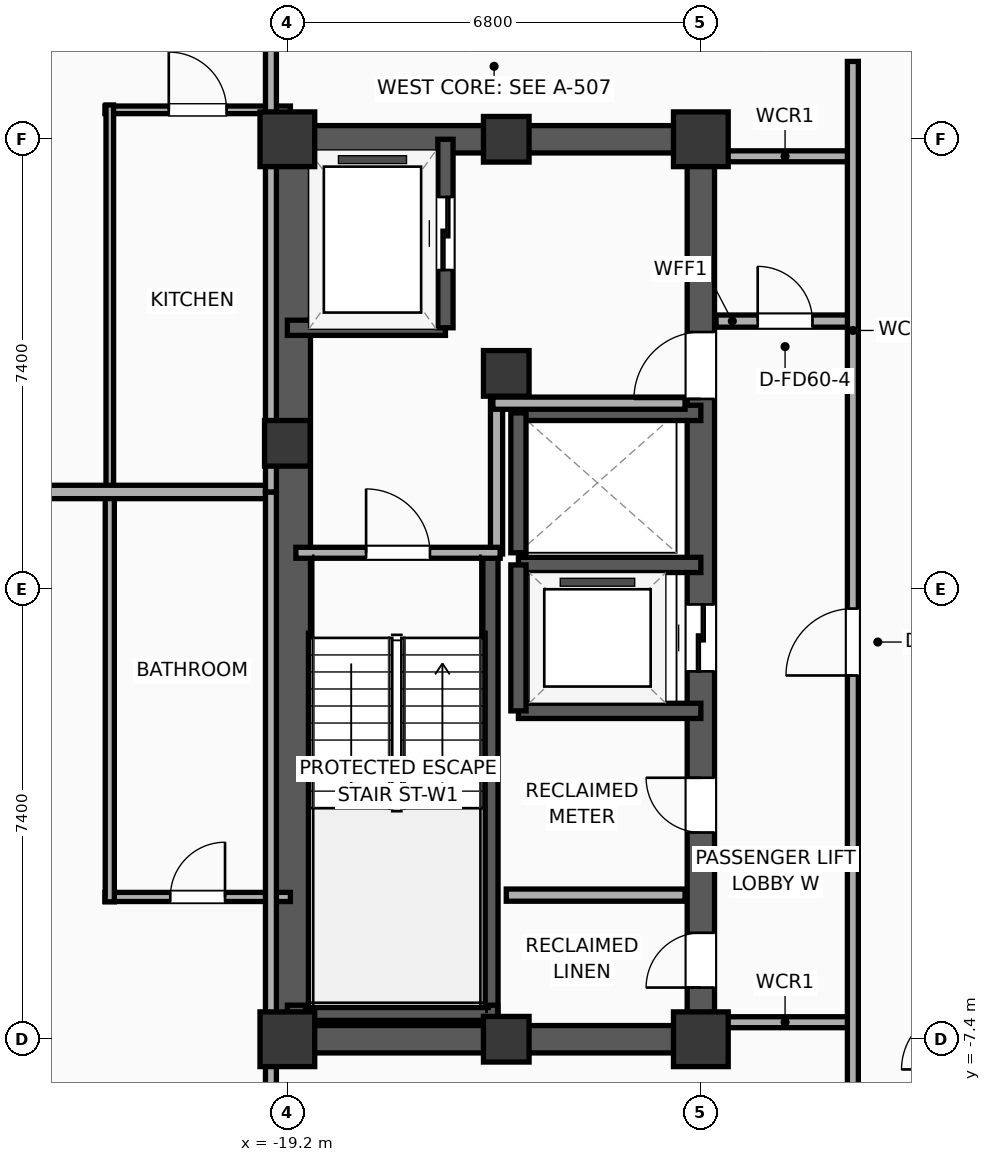
"""IFC4 building model, lengths in metres.
Left out: names, types, materials, properties, quantities, classifications, styles, units other than length and angle.
Written with IfcOpenShell. Run it as: python <this file> out.ifc"""

import sys

from ifc_helpers import new_model, si_unit, direction, frame, frame_2d, origin, origin_2d, place, context, subcontext, project, spatial, rectangle, extrude, element, fill, save


model = new_model("IFC4")
c1 = context("Model", 3, precision=1e-05, world=origin(), true_north=direction((0.0, 1.0)))
c2 = subcontext(c1, "Body", "Model", "MODEL_VIEW")
j1 = project(units=[si_unit("LENGTHUNIT", "METRE"), si_unit("PLANEANGLEUNIT", "RADIAN")], contexts=[c1])
p1 = place(None, origin())
s1 = spatial("IfcSite", under=j1, at=p1, CompositionType="ELEMENT")
p2 = place(p1, origin())
s2 = spatial("IfcBuilding", under=s1, at=p2, CompositionType="ELEMENT")
p3 = place(p2, frame((0.0, 0.0, 191.1)))
s3 = spatial("IfcBuildingStorey", under=s2, at=p3, CompositionType="ELEMENT", Elevation=191.1)
p4 = place(p3, frame((-19.2, -7.4, 0.0), z_axis=(0.0, 0.0, 1.0), x_axis=(1.0, 0.0, 0.0)))
e1 = element("IfcColumn", 1, at=p4, inside=s3, PredefinedType="COLUMN", context=c2, shape_type="SweptSolid", body=[
    extrude(rectangle(XDim=0.9, YDim=0.9, at=origin_2d()), origin(), (0.0, 0.0, 1.0), 3.9),
])
p5 = place(p3, frame((-19.2, 2.4, 0.0), z_axis=(0.0, 0.0, 1.0), x_axis=(1.0, 0.0, 0.0)))
e2 = element("IfcColumn", 2, at=p5, inside=s3, PredefinedType="COLUMN", context=c2, shape_type="SweptSolid", body=[
    extrude(rectangle(XDim=0.75, YDim=0.75, at=origin_2d()), origin(), (0.0, 0.0, 1.0), 3.9),
])
p6 = place(p3, frame((-19.2, 7.4, 0.0), z_axis=(0.0, 0.0, 1.0), x_axis=(1.0, 0.0, 0.0)))
e3 = element("IfcColumn", 3, at=p6, inside=s3, PredefinedType="COLUMN", context=c2, shape_type="SweptSolid", body=[
    extrude(rectangle(XDim=0.9, YDim=0.9, at=origin_2d()), origin(), (0.0, 0.0, 1.0), 3.9),
])
for number, where, z_axis, x_axis in (
    (4, (-15.6, -7.4, 0.0), (0.0, 0.0, 1.0), (1.0, 0.0, 0.0)),
    (5, (-15.6, 7.4, 0.0), (0.0, 0.0, 1.0), (1.0, 0.0, 0.0)),
):
    element("IfcColumn", number, at=place(p3, frame(where, z_axis=z_axis, x_axis=x_axis)), inside=s3, PredefinedType="COLUMN", context=c2, shape_type="SweptSolid", body=[
        extrude(rectangle(XDim=0.75, YDim=0.75, at=origin_2d()), origin(), (0.0, 0.0, 1.0), 3.9),
    ])
p7 = place(p3, frame((-12.4, -7.4, 0.0), z_axis=(0.0, 0.0, 1.0), x_axis=(1.0, 0.0, 0.0)))
e6 = element("IfcColumn", 6, at=p7, inside=s3, PredefinedType="COLUMN", context=c2, shape_type="SweptSolid", body=[
    extrude(rectangle(XDim=0.9, YDim=0.9, at=origin_2d()), origin(), (0.0, 0.0, 1.0), 3.9),
])
p8 = place(p3, frame((-15.6, 3.55, 0.0), z_axis=(0.0, 0.0, 1.0), x_axis=(1.0, 0.0, 0.0)))
e7 = element("IfcColumn", 7, at=p8, inside=s3, PredefinedType="COLUMN", context=c2, shape_type="SweptSolid", body=[
    extrude(rectangle(XDim=0.75, YDim=0.75, at=origin_2d()), origin(), (0.0, 0.0, 1.0), 3.9),
])
p9 = place(p3, frame((-12.4, 7.4, 0.0), z_axis=(0.0, 0.0, 1.0), x_axis=(1.0, 0.0, 0.0)))
e8 = element("IfcColumn", 8, at=p9, inside=s3, PredefinedType="COLUMN", context=c2, shape_type="SweptSolid", body=[
    extrude(rectangle(XDim=0.9, YDim=0.9, at=origin_2d()), origin(), (0.0, 0.0, 1.0), 3.9),
])
for number, where, z_axis, x_axis in (
    (9, (-19.425, -7.4, 0.0), (0.0, 0.0, 1.0), (1.0, 0.0, 0.0)),
    (10, (-19.425, 7.4, 0.0), (0.0, 0.0, 1.0), (1.0, 0.0, 0.0)),
):
    element("IfcWall", number, at=place(p3, frame(where, z_axis=z_axis, x_axis=x_axis)), inside=s3, PredefinedType="SHEAR", context=c2, shape_type="SweptSolid", body=[
        extrude(rectangle(XDim=7.25, YDim=0.45, at=frame_2d((3.625, 0.0))), origin(), (0.0, 0.0, 1.0), 3.5),
    ])
p10 = place(p3, frame((-19.145, -7.4, 0.0), z_axis=(0.0, 0.0, 1.0), x_axis=(0.0, 1.0, 0.0)))
e11 = element("IfcWall", 11, at=p10, inside=s3, PredefinedType="SHEAR", context=c2, shape_type="SweptSolid", body=[
    extrude(rectangle(XDim=14.8, YDim=0.65, at=frame_2d((7.4, 0.0))), origin(), (0.0, 0.0, 1.0), 3.5),
])
p11 = place(p3, frame((-12.4, -7.4, 0.0), z_axis=(0.0, 0.0, 1.0), x_axis=(0.0, 1.0, 0.0)))
e12 = element("IfcWall", 12, at=p11, inside=s3, PredefinedType="SHEAR", context=c2, shape_type="SweptSolid", body=[
    extrude(rectangle(XDim=14.8, YDim=0.45, at=frame_2d((7.4, 0.0))), origin(), (0.0, 0.0, 1.0), 3.5),
])
p12 = place(p11, frame((6.05, 0.0, 0.0)))
e13 = element("IfcOpeningElement", 13, at=p12, cuts=e12, PredefinedType="OPENING", context=c2, shape_type="SweptSolid", body=[
    extrude(rectangle(XDim=1.1, YDim=2.05, at=frame_2d((0.55, 1.025))), frame((0.0, 0.235, 0.0), z_axis=(0.0, -1.0, 0.0), x_axis=(1.0, 0.0, 0.0)), (0.0, 0.0, 1.0), 0.47),
])
p13 = place(p11, frame((10.53, 0.0, 0.0)))
e14 = element("IfcOpeningElement", 14, at=p13, cuts=e12, PredefinedType="OPENING", context=c2, shape_type="SweptSolid", body=[
    extrude(rectangle(XDim=1.1, YDim=2.05, at=frame_2d((0.55, 1.025))), frame((0.0, 0.235, 0.0), z_axis=(0.0, -1.0, 0.0), x_axis=(1.0, 0.0, 0.0)), (0.0, 0.0, 1.0), 0.47),
])
p14 = place(p11, frame((0.85, 0.0, 0.0)))
e15 = element("IfcOpeningElement", 15, at=p14, cuts=e12, PredefinedType="OPENING", context=c2, shape_type="SweptSolid", body=[
    extrude(rectangle(XDim=0.9, YDim=2.05, at=frame_2d((0.45, 1.025))), frame((0.0, 0.235, 0.0), z_axis=(0.0, -1.0, 0.0), x_axis=(1.0, 0.0, 0.0)), (0.0, 0.0, 1.0), 0.47),
])
p15 = place(p11, frame((3.4, 0.0, 0.0)))
e16 = element("IfcOpeningElement", 16, at=p15, cuts=e12, PredefinedType="OPENING", context=c2, shape_type="SweptSolid", body=[
    extrude(rectangle(XDim=0.9, YDim=2.05, at=frame_2d((0.45, 1.025))), frame((0.0, 0.235, 0.0), z_axis=(0.0, -1.0, 0.0), x_axis=(1.0, 0.0, 0.0)), (0.0, 0.0, 1.0), 0.47),
])
p16 = place(p3, frame((-15.86, -7.085, 0.0), z_axis=(0.0, 0.0, 1.0), x_axis=(0.0, 1.0, 0.0)))
e17 = element("IfcWall", 17, at=p16, inside=s3, PredefinedType="SOLIDWALL", context=c2, shape_type="SweptSolid", body=[
    extrude(rectangle(XDim=7.685, YDim=0.25, at=frame_2d((3.843, 0.0))), origin(), (0.0, 0.0, 1.0), 3.5),
])
p17 = place(p3, frame((-19.2, -6.965, 0.0), z_axis=(0.0, 0.0, 1.0), x_axis=(1.0, 0.0, 0.0)))
e18 = element("IfcWall", 18, at=p17, inside=s3, PredefinedType="SOLIDWALL", context=c2, shape_type="SweptSolid", body=[
    extrude(rectangle(XDim=3.46, YDim=0.25, at=frame_2d((1.73, 0.0))), origin(), (0.0, 0.0, 1.0), 3.5),
])
p18 = place(p3, frame((-19.2, 4.3, 0.0), z_axis=(0.0, 0.0, 1.0), x_axis=(1.0, 0.0, 0.0)))
e19 = element("IfcWall", 19, at=p18, inside=s3, PredefinedType="SOLIDWALL", context=c2, shape_type="SweptSolid", body=[
    extrude(rectangle(XDim=2.6, YDim=0.25, at=frame_2d((1.3, 0.0))), origin(), (0.0, 0.0, 1.0), 3.5),
])
p19 = place(p3, frame((-16.6, 4.3, 0.0), z_axis=(0.0, 0.0, 1.0), x_axis=(0.0, 1.0, 0.0)))
e20 = element("IfcWall", 20, at=p19, inside=s3, PredefinedType="SOLIDWALL", context=c2, shape_type="SweptSolid", body=[
    extrude(rectangle(XDim=3.1, YDim=0.25, at=frame_2d((1.55, 0.0))), origin(), (0.0, 0.0, 1.0), 3.5),
])
p20 = place(p19, frame((0.95, 0.0, 0.0)))
e21 = element("IfcOpeningElement", 21, at=p20, cuts=e20, PredefinedType="OPENING", context=c2, shape_type="SweptSolid", body=[
    extrude(rectangle(XDim=1.2, YDim=2.05, at=frame_2d((0.6, 1.025))), frame((0.0, 0.135, 0.0), z_axis=(0.0, -1.0, 0.0), x_axis=(1.0, 0.0, 0.0)), (0.0, 0.0, 1.0), 0.27),
])
for number, where, z_axis, x_axis in (
    (22, (-15.4, -2.0, 0.0), (0.0, 0.0, 1.0), (1.0, 0.0, 0.0)),
    (23, (-12.4, 0.4, 0.0), (0.0, 0.0, 1.0), (-1.0, 0.0, 0.0)),
):
    element("IfcWall", number, at=place(p3, frame(where, z_axis=z_axis, x_axis=x_axis)), inside=s3, PredefinedType="SOLIDWALL", context=c2, shape_type="SweptSolid", body=[
        extrude(rectangle(XDim=3.0, YDim=0.25, at=frame_2d((1.5, 0.0))), origin(), (0.0, 0.0, 1.0), 3.5),
    ])
p21 = place(p3, frame((-15.4, 0.4, 0.0), z_axis=(0.0, 0.0, 1.0), x_axis=(0.0, -1.0, 0.0)))
e24 = element("IfcWall", 24, at=p21, inside=s3, PredefinedType="SOLIDWALL", context=c2, shape_type="SweptSolid", body=[
    extrude(rectangle(XDim=2.4, YDim=0.25, at=frame_2d((1.2, 0.0))), origin(), (0.0, 0.0, 1.0), 3.5),
])
p22 = place(p3, frame((-12.4, 2.9, 0.0), z_axis=(0.0, 0.0, 1.0), x_axis=(-1.0, 0.0, 0.0)))
e25 = element("IfcWall", 25, at=p22, inside=s3, PredefinedType="SOLIDWALL", context=c2, shape_type="SweptSolid", body=[
    extrude(rectangle(XDim=3.0, YDim=0.25, at=frame_2d((1.5, 0.0))), origin(), (0.0, 0.0, 1.0), 3.5),
])
p23 = place(p3, frame((-15.4, 2.9, 0.0), z_axis=(0.0, 0.0, 1.0), x_axis=(0.0, -1.0, 0.0)))
e26 = element("IfcWall", 26, at=p23, inside=s3, PredefinedType="SOLIDWALL", context=c2, shape_type="SweptSolid", body=[
    extrude(rectangle(XDim=2.3, YDim=0.25, at=frame_2d((1.15, 0.0))), origin(), (0.0, 0.0, 1.0), 3.5),
])
p24 = place(p3, frame((-15.76, 0.58, 0.0), z_axis=(0.0, 0.0, 1.0), x_axis=(0.0, 1.0, 0.0)))
e27 = element("IfcWall", 27, at=p24, inside=s3, PredefinedType="PARTITIONING", context=c2, shape_type="SweptSolid", body=[
    extrude(rectangle(XDim=2.52, YDim=0.2, at=frame_2d((1.26, 0.0))), origin(), (0.0, 0.0, 1.0), 3.5),
])
p25 = place(p3, frame((-15.82, 3.06, 0.0), z_axis=(0.0, 0.0, 1.0), x_axis=(1.0, 0.0, 0.0)))
e28 = element("IfcWall", 28, at=p25, inside=s3, PredefinedType="PARTITIONING", context=c2, shape_type="SweptSolid", body=[
    extrude(rectangle(XDim=3.16, YDim=0.2, at=frame_2d((1.58, 0.0))), origin(), (0.0, 0.0, 1.0), 3.5),
])
p26 = place(p3, frame((-19.06, 0.6, 0.0), z_axis=(0.0, 0.0, 1.0), x_axis=(1.0, 0.0, 0.0)))
e29 = element("IfcWall", 29, at=p26, inside=s3, PredefinedType="PARTITIONING", context=c2, shape_type="SweptSolid", body=[
    extrude(rectangle(XDim=3.36, YDim=0.18, at=frame_2d((1.68, 0.0))), origin(), (0.0, 0.0, 1.0), 3.5),
])
p27 = place(p26, frame((1.155, 0.0, 0.0)))
e30 = element("IfcOpeningElement", 30, at=p27, cuts=e29, PredefinedType="OPENING", context=c2, shape_type="SweptSolid", body=[
    extrude(rectangle(XDim=1.05, YDim=2.05, at=frame_2d((0.525, 1.025))), frame((0.0, 0.1, 0.0), z_axis=(0.0, -1.0, 0.0), x_axis=(1.0, 0.0, 0.0)), (0.0, 0.0, 1.0), 0.2),
])
p28 = place(p3, frame((-15.6, -5.03, 0.0), z_axis=(0.0, 0.0, 1.0), x_axis=(1.0, 0.0, 0.0)))
e31 = element("IfcWall", 31, at=p28, inside=s3, PredefinedType="PARTITIONING", context=c2, shape_type="SweptSolid", body=[
    extrude(rectangle(XDim=2.94, YDim=0.2, at=frame_2d((1.47, 0.0))), origin(), (0.0, 0.0, 1.0), 3.5),
])
p29 = place(p3, frame((-12.15, 4.41, 0.0), z_axis=(0.0, 0.0, 1.0), x_axis=(1.0, 0.0, 0.0)))
e32 = element("IfcWall", 32, at=p29, inside=s3, PredefinedType="PARTITIONING", context=c2, shape_type="SweptSolid", body=[
    extrude(rectangle(XDim=2.27, YDim=0.2, at=frame_2d((1.135, 0.0))), origin(), (0.0, 0.0, 1.0), 3.5),
])
p30 = place(p29, frame((0.685, 0.0, 0.0)))
e33 = element("IfcOpeningElement", 33, at=p30, cuts=e32, PredefinedType="OPENING", context=c2, shape_type="SweptSolid", body=[
    extrude(rectangle(XDim=0.9, YDim=2.05, at=frame_2d((0.45, 1.025))), frame((0.0, 0.11, 0.0), z_axis=(0.0, -1.0, 0.0), x_axis=(1.0, 0.0, 0.0)), (0.0, 0.0, 1.0), 0.22),
])
for number, where, z_axis, x_axis in (
    (34, (-12.15, 7.12, 0.0), (0.0, 0.0, 1.0), (1.0, 0.0, 0.0)),
    (35, (-12.15, -7.12, 0.0), (0.0, 0.0, 1.0), (1.0, 0.0, 0.0)),
):
    element("IfcWall", number, at=place(p3, frame(where, z_axis=z_axis, x_axis=x_axis)), inside=s3, PredefinedType="PARTITIONING", context=c2, shape_type="SweptSolid", body=[
        extrude(rectangle(XDim=2.27, YDim=0.18, at=frame_2d((1.135, 0.0))), origin(), (0.0, 0.0, 1.0), 2.54),
    ])
p31 = place(p3, frame((-9.9, -8.68, 0.0), z_axis=(0.0, 0.0, 1.0), x_axis=(0.0, 1.0, 0.0)))
e36 = element("IfcWall", 36, at=p31, inside=s3, PredefinedType="PARTITIONING", context=c2, shape_type="SweptSolid", body=[
    extrude(rectangle(XDim=17.36, YDim=0.18, at=frame_2d((8.68, 0.0))), origin(), (0.0, 0.0, 1.0), 3.5),
])
p32 = place(p31, frame((7.262, 0.0, 0.0)))
e37 = element("IfcOpeningElement", 37, at=p32, cuts=e36, PredefinedType="OPENING", context=c2, shape_type="SweptSolid", body=[
    extrude(rectangle(XDim=1.1, YDim=2.05, at=frame_2d((0.55, 1.025))), frame((0.0, 0.1, 0.0), z_axis=(0.0, -1.0, 0.0), x_axis=(1.0, 0.0, 0.0)), (0.0, 0.0, 1.0), 0.2),
])
p33 = place(p3, frame((-22.2, -5.06, 0.0), z_axis=(0.0, 0.0, 1.0), x_axis=(1.0, 0.0, 0.0)))
e38 = element("IfcWall", 38, at=p33, inside=s3, PredefinedType="PLUMBINGWALL", context=c2, shape_type="SweptSolid", body=[
    extrude(rectangle(XDim=3.05, YDim=0.15, at=frame_2d((1.525, 0.0))), origin(), (0.0, 0.0, 1.0), 3.5),
])
p34 = place(p33, frame((1.075, 0.0, 0.0)))
e39 = element("IfcOpeningElement", 39, at=p34, cuts=e38, PredefinedType="OPENING", context=c2, shape_type="SweptSolid", body=[
    extrude(rectangle(XDim=0.9, YDim=2.05, at=frame_2d((0.45, 1.025))), frame((0.0, 0.085, 0.0), z_axis=(0.0, -1.0, 0.0), x_axis=(1.0, 0.0, 0.0)), (0.0, 0.0, 1.0), 0.17),
])
p35 = place(p3, frame((-22.12, -5.14, 0.0), z_axis=(0.0, 0.0, 1.0), x_axis=(0.0, 1.0, 0.0)))
e40 = element("IfcWall", 40, at=p35, inside=s3, PredefinedType="PLUMBINGWALL", context=c2, shape_type="SweptSolid", body=[
    extrude(rectangle(XDim=6.72, YDim=0.15, at=frame_2d((3.36, 0.0))), origin(), (0.0, 0.0, 1.0), 3.5),
])
p36 = place(p3, frame((-22.2, 7.884, 0.0), z_axis=(0.0, 0.0, 1.0), x_axis=(1.0, 0.0, 0.0)))
e41 = element("IfcWall", 41, at=p36, inside=s3, PredefinedType="PARTITIONING", context=c2, shape_type="SweptSolid", body=[
    extrude(rectangle(XDim=3.05, YDim=0.125, at=frame_2d((1.525, 0.0))), origin(), (0.0, 0.0, 1.0), 2.39),
])
p37 = place(p36, frame((1.05, 0.0, 0.0)))
e42 = element("IfcOpeningElement", 42, at=p37, cuts=e41, PredefinedType="OPENING", context=c2, shape_type="SweptSolid", body=[
    extrude(rectangle(XDim=0.95, YDim=2.05, at=frame_2d((0.475, 1.025))), frame((0.0, 0.073, 0.0), z_axis=(0.0, -1.0, 0.0), x_axis=(1.0, 0.0, 0.0)), (0.0, 0.0, 1.0), 0.145),
])
p38 = place(p3, frame((-22.12, 1.62, 0.0), z_axis=(0.0, 0.0, 1.0), x_axis=(0.0, 1.0, 0.0)))
e43 = element("IfcWall", 43, at=p38, inside=s3, PredefinedType="PARTITIONING", context=c2, shape_type="SweptSolid", body=[
    extrude(rectangle(XDim=6.344, YDim=0.125, at=frame_2d((3.172, 0.0))), origin(), (0.0, 0.0, 1.0), 3.5),
])
p39 = place(p3, frame((-19.47, 1.6, 0.0), z_axis=(0.0, 0.0, 1.0), x_axis=(-1.0, 0.0, 0.0)))
e44 = element("IfcWall", 44, at=p39, inside=s3, PredefinedType="PARTITIONING", context=c2, shape_type="SweptSolid", body=[
    extrude(rectangle(XDim=13.754, YDim=0.22, at=frame_2d((6.877, 0.0))), origin(), (0.0, 0.0, 1.0), 3.5),
])
p40 = place(p3, frame((-19.47, -22.652, 0.0), z_axis=(0.0, 0.0, 1.0), x_axis=(0.0, 1.0, 0.0)))
e45 = element("IfcWall", 45, at=p40, inside=s3, PredefinedType="PARTITIONING", context=c2, shape_type="SweptSolid", body=[
    extrude(rectangle(XDim=24.252, YDim=0.18, at=frame_2d((12.126, 0.0))), origin(), (0.0, 0.0, 1.0), 2.39),
])
p41 = place(p40, frame((12.871, 0.0, 0.0)))
e46 = element("IfcOpeningElement", 46, at=p41, cuts=e45, PredefinedType="OPENING", context=c2, shape_type="SweptSolid", body=[
    extrude(rectangle(XDim=0.9, YDim=2.05, at=frame_2d((0.45, 1.025))), frame((0.0, 0.1, 0.0), z_axis=(0.0, -1.0, 0.0), x_axis=(1.0, 0.0, 0.0)), (0.0, 0.0, 1.0), 0.2),
])
p42 = place(p3, frame((-19.47, 1.6, 0.0), z_axis=(0.0, 0.0, 1.0), x_axis=(0.0, 1.0, 0.0)))
e47 = element("IfcWall", 47, at=p42, inside=s3, PredefinedType="PARTITIONING", context=c2, shape_type="SweptSolid", body=[
    extrude(rectangle(XDim=16.431, YDim=0.18, at=frame_2d((8.216, 0.0))), origin(), (0.0, 0.0, 1.0), 2.39),
])
p43 = place(p42, frame((7.279, 0.0, 0.0)))
e48 = element("IfcOpeningElement", 48, at=p43, cuts=e47, PredefinedType="OPENING", context=c2, shape_type="SweptSolid", body=[
    extrude(rectangle(XDim=0.9, YDim=2.05, at=frame_2d((0.45, 1.025))), frame((0.0, 0.1, 0.0), z_axis=(0.0, -1.0, 0.0), x_axis=(1.0, 0.0, 0.0)), (0.0, 0.0, 1.0), 0.2),
])
p44 = place(p20, origin())
e49 = element("IfcDoor", 49, at=p44, inside=s3, OperationType="SLIDING_TO_LEFT", PredefinedType="DOOR", context=c2, shape_type="SweptSolid", body=[
    extrude(rectangle(XDim=1.2, YDim=2.05, at=frame_2d((0.6, 1.025))), frame((0.0, 0.025, 0.0), z_axis=(0.0, -1.0, 0.0), x_axis=(1.0, 0.0, 0.0)), (0.0, 0.0, 1.0), 0.05),
])
fill(e21, e49)
p45 = place(p12, origin())
e50 = element("IfcDoor", 50, at=p45, inside=s3, OperationType="SLIDING_TO_LEFT", PredefinedType="DOOR", context=c2, shape_type="SweptSolid", body=[
    extrude(rectangle(XDim=1.1, YDim=2.05, at=frame_2d((0.55, 1.025))), frame((0.0, 0.025, 0.0), z_axis=(0.0, -1.0, 0.0), x_axis=(1.0, 0.0, 0.0)), (0.0, 0.0, 1.0), 0.05),
])
fill(e13, e50)
p46 = place(p27, origin())
e51 = element("IfcDoor", 51, at=p46, inside=s3, OperationType="SINGLE_SWING_LEFT", PredefinedType="DOOR", context=c2, shape_type="SweptSolid", body=[
    extrude(rectangle(XDim=1.05, YDim=2.05, at=frame_2d((0.525, 1.025))), frame((0.0, 0.025, 0.0), z_axis=(0.0, -1.0, 0.0), x_axis=(1.0, 0.0, 0.0)), (0.0, 0.0, 1.0), 0.05),
])
fill(e30, e51)
p47 = place(p30, origin())
e52 = element("IfcDoor", 52, at=p47, inside=s3, OperationType="SINGLE_SWING_LEFT", PredefinedType="DOOR", context=c2, shape_type="SweptSolid", body=[
    extrude(rectangle(XDim=0.9, YDim=2.05, at=frame_2d((0.45, 1.025))), frame((0.0, 0.025, 0.0), z_axis=(0.0, -1.0, 0.0), x_axis=(1.0, 0.0, 0.0)), (0.0, 0.0, 1.0), 0.05),
])
fill(e33, e52)
p48 = place(p32, origin())
e53 = element("IfcDoor", 53, at=p48, inside=s3, OperationType="SINGLE_SWING_LEFT", PredefinedType="DOOR", context=c2, shape_type="SweptSolid", body=[
    extrude(rectangle(XDim=1.1, YDim=2.05, at=frame_2d((0.55, 1.025))), frame((0.0, 0.025, 0.0), z_axis=(0.0, -1.0, 0.0), x_axis=(1.0, 0.0, 0.0)), (0.0, 0.0, 1.0), 0.05),
])
fill(e37, e53)
p49 = place(p34, origin())
e54 = element("IfcDoor", 54, at=p49, inside=s3, OperationType="SINGLE_SWING_RIGHT", PredefinedType="DOOR", context=c2, shape_type="SweptSolid", body=[
    extrude(rectangle(XDim=0.9, YDim=2.05, at=frame_2d((0.45, 1.025))), frame((0.0, 0.025, 0.0), z_axis=(0.0, -1.0, 0.0), x_axis=(1.0, 0.0, 0.0)), (0.0, 0.0, 1.0), 0.05),
])
fill(e39, e54)
p50 = place(p37, origin())
e55 = element("IfcDoor", 55, at=p50, inside=s3, OperationType="SINGLE_SWING_LEFT", PredefinedType="DOOR", context=c2, shape_type="SweptSolid", body=[
    extrude(rectangle(XDim=0.95, YDim=2.05, at=frame_2d((0.475, 1.025))), frame((0.0, 0.025, 0.0), z_axis=(0.0, -1.0, 0.0), x_axis=(1.0, 0.0, 0.0)), (0.0, 0.0, 1.0), 0.05),
])
fill(e42, e55)
p51 = place(p13, origin())
e56 = element("IfcDoor", 56, at=p51, inside=s3, OperationType="SINGLE_SWING_LEFT", PredefinedType="DOOR", context=c2, shape_type="SweptSolid", body=[
    extrude(rectangle(XDim=1.1, YDim=2.05, at=frame_2d((0.55, 1.025))), frame((0.0, 0.025, 0.0), z_axis=(0.0, -1.0, 0.0), x_axis=(1.0, 0.0, 0.0)), (0.0, 0.0, 1.0), 0.05),
])
fill(e14, e56)
p52 = place(p14, origin())
e57 = element("IfcDoor", 57, at=p52, inside=s3, OperationType="SINGLE_SWING_LEFT", PredefinedType="DOOR", context=c2, shape_type="SweptSolid", body=[
    extrude(rectangle(XDim=0.9, YDim=2.05, at=frame_2d((0.45, 1.025))), frame((0.0, 0.025, 0.0), z_axis=(0.0, -1.0, 0.0), x_axis=(1.0, 0.0, 0.0)), (0.0, 0.0, 1.0), 0.05),
])
fill(e15, e57)
p53 = place(p15, origin())
e58 = element("IfcDoor", 58, at=p53, inside=s3, OperationType="SINGLE_SWING_RIGHT", PredefinedType="DOOR", context=c2, shape_type="SweptSolid", body=[
    extrude(rectangle(XDim=0.9, YDim=2.05, at=frame_2d((0.45, 1.025))), frame((0.0, 0.025, 0.0), z_axis=(0.0, -1.0, 0.0), x_axis=(1.0, 0.0, 0.0)), (0.0, 0.0, 1.0), 0.05),
])
fill(e16, e58)
save(model, sys.argv[1])
